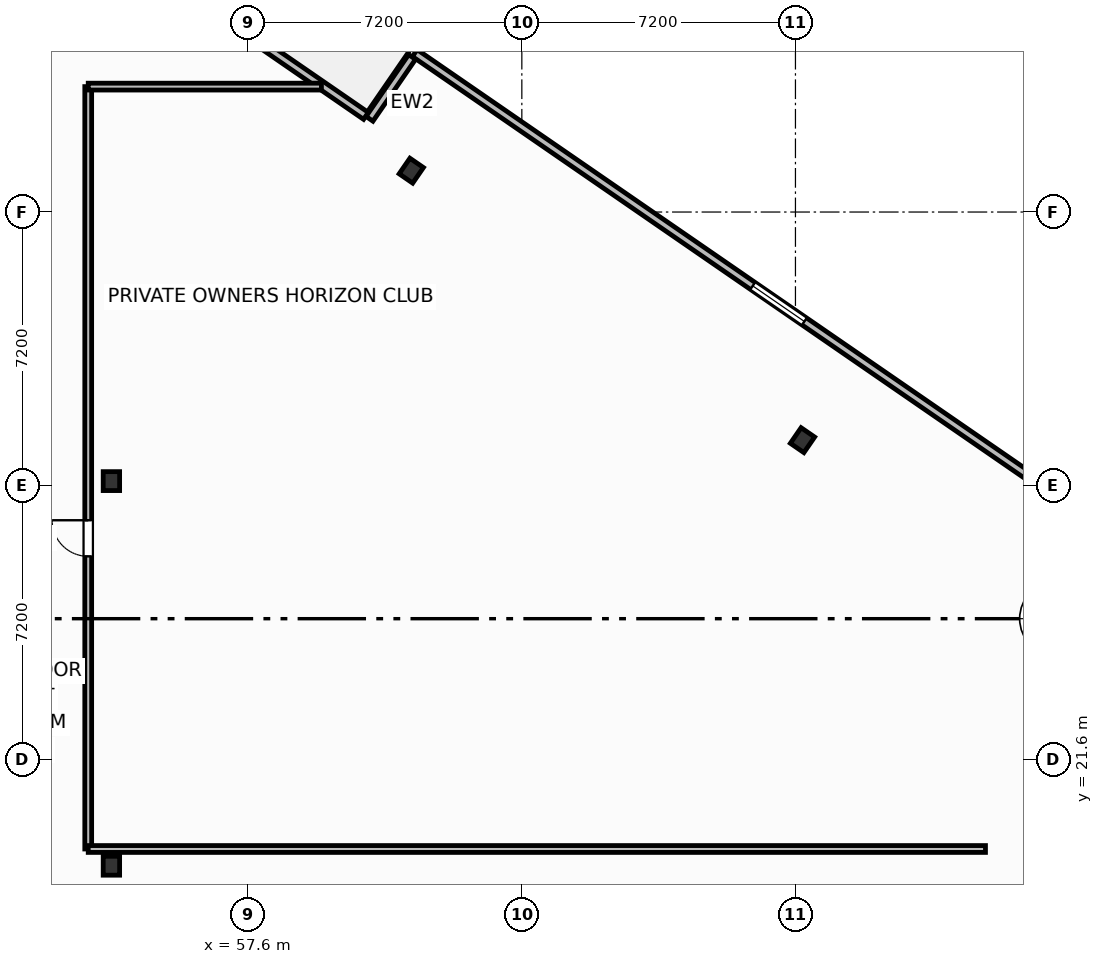
"""IFC4 building model, lengths in metres.
Left out: names, types, materials, properties, quantities, classifications, styles, units other than length and angle.
Written with IfcOpenShell. Run it as: python <this file> out.ifc"""

import sys

from ifc_helpers import new_model, si_unit, direction, frame, frame_2d, origin, origin_2d, place, context, subcontext, project, spatial, rectangle, i_section, extrude, element, fill, save


model = new_model("IFC4")
c1 = context("Model", 3, precision=1e-05, world=origin(), true_north=direction((0.0, 1.0)))
c2 = subcontext(c1, "Body", "Model", "MODEL_VIEW")
j1 = project(units=[si_unit("LENGTHUNIT", "METRE"), si_unit("PLANEANGLEUNIT", "RADIAN")], contexts=[c1])
p1 = place(None, origin())
s1 = spatial("IfcSite", under=j1, at=p1, CompositionType="ELEMENT")
p2 = place(p1, origin())
s2 = spatial("IfcBuilding", under=s1, at=p2, CompositionType="ELEMENT")
p3 = place(p2, frame((0.0, 0.0, 49.2)))
s3 = spatial("IfcBuildingStorey", under=s2, at=p3, CompositionType="ELEMENT", Elevation=49.2)
for number, where, z_axis, x_axis in (
    (1, (54.0, 18.8, 0.0), (0.0, 0.0, 1.0), (1.0, 0.0, 0.0)),
    (2, (54.0, 28.92, 0.0), (0.0, 0.0, 1.0), (1.0, 0.0, 0.0)),
    (3, (72.186, 29.997, 0.0), (0.0, 0.0, 1.0), (0.824, -0.567, 0.0)),
    (4, (61.891, 37.088, 0.0), (0.0, 0.0, 1.0), (0.824, -0.567, 0.0)),
):
    element("IfcColumn", number, at=place(p3, frame(where, z_axis=z_axis, x_axis=x_axis)), inside=s3, PredefinedType="COLUMN", context=c2, shape_type="SweptSolid", body=[
        extrude(i_section(OverallWidth=0.432, OverallDepth=0.498, WebThickness=0.056, FlangeThickness=0.089, FilletRadius=0.025, at=origin_2d()), origin(), (0.0, 0.0, 1.0), 3.7),
    ])
p4 = place(p3, frame((55.757, 41.933, 0.0), z_axis=(0.0, 0.0, 1.0), x_axis=(0.823534636215, -0.567265989598, 0.0)))
e5 = element("IfcWall", 5, at=p4, inside=s3, PredefinedType="SOLIDWALL", context=c2, shape_type="SweptSolid", body=[
    extrude(rectangle(XDim=6.0, YDim=0.22, at=frame_2d((3.0, 0.0))), origin(), (0.0, 0.0, 1.0), 2.73),
])
p5 = place(p4, frame((0.696, 0.0, 0.0)))
e6 = element("IfcOpeningElement", 6, at=p5, cuts=e5, PredefinedType="OPENING", context=c2, shape_type="SweptSolid", body=[
    extrude(rectangle(XDim=1.5, YDim=2.25, at=frame_2d((0.75, 1.125))), frame((0.0, 0.12, 0.0), z_axis=(0.0, -1.0, 0.0), x_axis=(1.0, 0.0, 0.0)), (0.0, 0.0, 1.0), 0.24),
])
p6 = place(p3, frame((81.127, 26.995, 0.0), z_axis=(0.0, 0.0, 1.0), x_axis=(-0.823530169317, 0.567272474411, 0.0)))
e7 = element("IfcWall", 7, at=p6, inside=s3, PredefinedType="SOLIDWALL", context=c2, shape_type="SweptSolid", body=[
    extrude(rectangle(XDim=23.247, YDim=0.22, at=frame_2d((11.624, 0.0))), origin(), (0.0, 0.0, 1.0), 2.73),
])
p7 = place(p6, frame((10.799, 0.0, 0.8)))
e8 = element("IfcOpeningElement", 8, at=p7, cuts=e7, PredefinedType="OPENING", context=c2, shape_type="SweptSolid", body=[
    extrude(rectangle(XDim=1.65, YDim=1.65, at=frame_2d((0.825, 0.825))), frame((0.0, 0.12, 0.0), z_axis=(0.0, -1.0, 0.0), x_axis=(1.0, 0.0, 0.0)), (0.0, 0.0, 1.0), 0.24),
])
p8 = place(p3, frame((61.912, 40.079, 0.0), z_axis=(0.0, 0.0, 1.0), x_axis=(-0.567189720735, -0.82358716642, 0.0)))
e9 = element("IfcWall", 9, at=p8, inside=s3, PredefinedType="SOLIDWALL", context=c2, shape_type="SweptSolid", body=[
    extrude(rectangle(XDim=1.975, YDim=0.22, at=frame_2d((0.987, 0.0))), origin(), (0.0, 0.0, 1.0), 2.73),
])
p9 = place(p3, frame((53.39, 19.24, 0.0), z_axis=(0.0, 0.0, 1.0), x_axis=(0.0, 1.0, 0.0)))
e10 = element("IfcWall", 10, at=p9, inside=s3, PredefinedType="PARTITIONING", context=c2, shape_type="SweptSolid", body=[
    extrude(rectangle(XDim=20.06, YDim=0.18, at=frame_2d((10.03, 0.0))), origin(), (0.0, 0.0, 1.0), 3.45),
])
p10 = place(p9, frame((7.7, 0.0, 0.0)))
e11 = element("IfcOpeningElement", 11, at=p10, cuts=e10, PredefinedType="OPENING", context=c2, shape_type="SweptSolid", body=[
    extrude(rectangle(XDim=0.95, YDim=2.05, at=frame_2d((0.475, 1.025))), frame((0.0, 0.1, 0.0), z_axis=(0.0, -1.0, 0.0), x_axis=(1.0, 0.0, 0.0)), (0.0, 0.0, 1.0), 0.2),
])
p11 = place(p3, frame((53.39, 19.24, 0.0), z_axis=(0.0, 0.0, 1.0), x_axis=(1.0, 0.0, 0.0)))
e12 = element("IfcWall", 12, at=p11, inside=s3, PredefinedType="PARTITIONING", context=c2, shape_type="SweptSolid", body=[
    extrude(rectangle(XDim=23.61, YDim=0.18, at=frame_2d((11.805, 0.0))), origin(), (0.0, 0.0, 1.0), 3.45),
])
p12 = place(p3, frame((53.39, 39.3, 0.0), z_axis=(0.0, 0.0, 1.0), x_axis=(1.0, 0.0, 0.0)))
e13 = element("IfcWall", 13, at=p12, inside=s3, PredefinedType="PARTITIONING", context=c2, shape_type="SweptSolid", body=[
    extrude(rectangle(XDim=6.136, YDim=0.18, at=frame_2d((3.068, 0.0))), origin(), (0.0, 0.0, 1.0), 3.45),
])
p13 = place(p7, origin())
e14 = element("IfcWindow", 14, at=p13, inside=s3, PartitioningType="SINGLE_PANEL", PredefinedType="WINDOW", context=c2, shape_type="SweptSolid", body=[
    extrude(rectangle(XDim=1.65, YDim=1.65, at=frame_2d((0.825, 0.825))), frame((0.0, 0.03, 0.0), z_axis=(0.0, -1.0, 0.0), x_axis=(1.0, 0.0, 0.0)), (0.0, 0.0, 1.0), 0.06),
])
fill(e8, e14)
p14 = place(p10, origin())
e15 = element("IfcDoor", 15, at=p14, inside=s3, OperationType="SINGLE_SWING_RIGHT", PredefinedType="DOOR", context=c2, shape_type="SweptSolid", body=[
    extrude(rectangle(XDim=0.95, YDim=2.05, at=frame_2d((0.475, 1.025))), frame((0.0, 0.025, 0.0), z_axis=(0.0, -1.0, 0.0), x_axis=(1.0, 0.0, 0.0)), (0.0, 0.0, 1.0), 0.05),
])
fill(e11, e15)
save(model, sys.argv[1])
